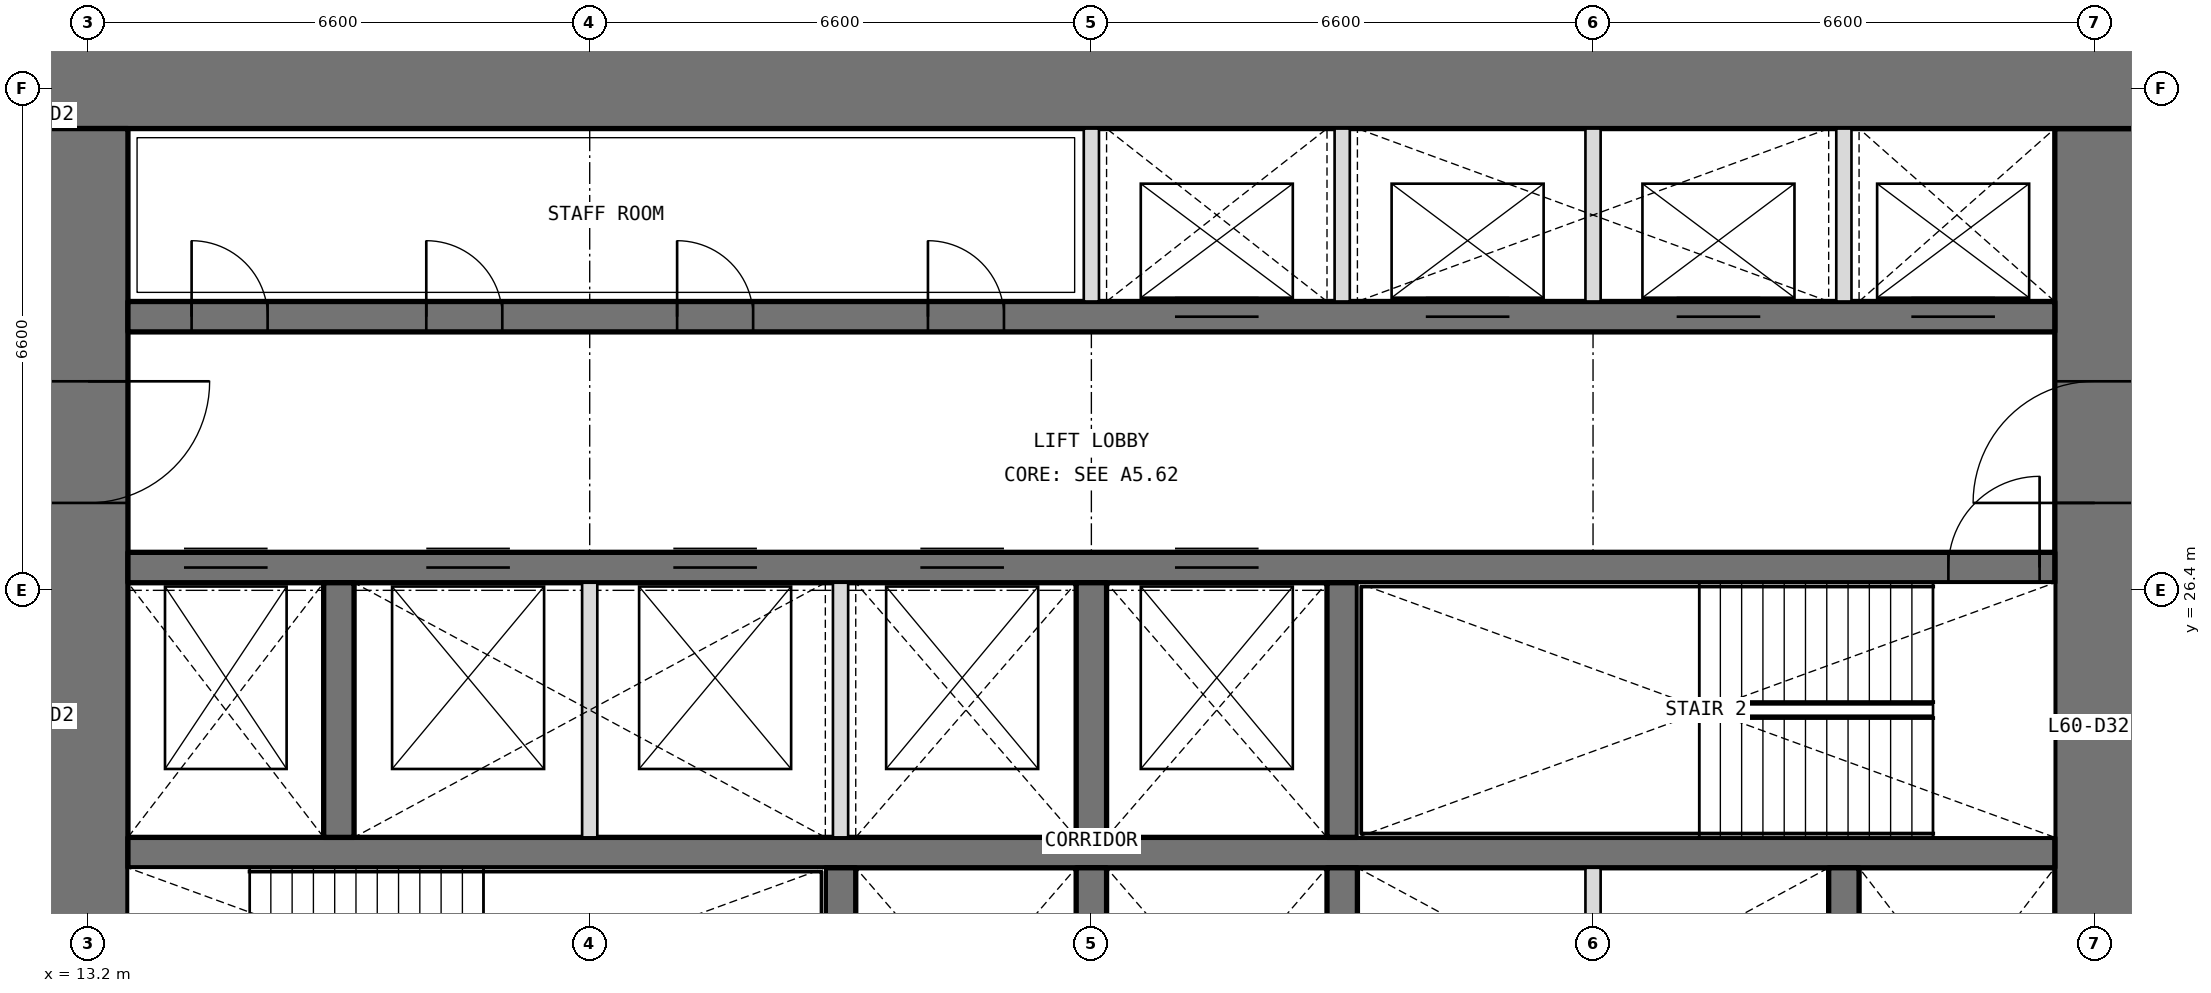
"""IFC4 building model, lengths in metres.
Left out: names, types, materials, properties, quantities, classifications, styles, units other than length and angle.
Written with IfcOpenShell. Run it as: python <this file> out.ifc"""

import sys

from ifc_helpers import new_model, si_unit, direction, frame, frame_2d, origin, place, context, subcontext, project, spatial, rectangle, extrude, element, fill, save


model = new_model("IFC4")
c1 = context("Model", 3, precision=1e-05, world=origin(), true_north=direction((0.0, 1.0)))
c2 = subcontext(c1, "Body", "Model", "MODEL_VIEW")
j1 = project(units=[si_unit("LENGTHUNIT", "METRE"), si_unit("PLANEANGLEUNIT", "RADIAN")], contexts=[c1])
p1 = place(None, origin())
s1 = spatial("IfcSite", under=j1, at=p1, CompositionType="ELEMENT")
p2 = place(p1, origin())
s2 = spatial("IfcBuilding", under=s1, at=p2, CompositionType="ELEMENT")
p3 = place(p2, frame((0.0, 0.0, 262.8)))
s3 = spatial("IfcBuildingStorey", under=s2, at=p3, CompositionType="ELEMENT", Elevation=262.8)
p4 = place(p3, frame((39.6, 13.725, 0.0), z_axis=(0.0, 0.0, 1.0), x_axis=(0.0, 1.0, 0.0)))
e1 = element("IfcWall", 1, at=p4, inside=s3, PredefinedType="SHEAR", context=c2, shape_type="SweptSolid", body=[
    extrude(rectangle(XDim=18.75, YDim=1.05, at=frame_2d((9.375, 0.0))), origin(), (0.0, 0.0, 1.0), 4.2),
])
p5 = place(p4, frame((3.025, 0.0, 0.0)))
e2 = element("IfcOpeningElement", 2, at=p5, cuts=e1, PredefinedType="OPENING", context=c2, shape_type="SweptSolid", body=[
    extrude(rectangle(XDim=1.6, YDim=2.1, at=frame_2d((0.8, 1.05))), frame((0.0, 0.535, 0.0), z_axis=(0.0, -1.0, 0.0), x_axis=(1.0, 0.0, 0.0)), (0.0, 0.0, 1.0), 1.07),
])
p6 = place(p4, frame((13.825, 0.0, 0.0)))
e3 = element("IfcOpeningElement", 3, at=p6, cuts=e1, PredefinedType="OPENING", context=c2, shape_type="SweptSolid", body=[
    extrude(rectangle(XDim=1.6, YDim=2.1, at=frame_2d((0.8, 1.05))), frame((0.0, 0.535, 0.0), z_axis=(0.0, -1.0, 0.0), x_axis=(1.0, 0.0, 0.0)), (0.0, 0.0, 1.0), 1.07),
])
p7 = place(p3, frame((40.125, 33.0, 0.0), z_axis=(0.0, 0.0, 1.0), x_axis=(-1.0, 0.0, 0.0)))
e4 = element("IfcWall", 4, at=p7, inside=s3, PredefinedType="SHEAR", context=c2, shape_type="SweptSolid", body=[
    extrude(rectangle(XDim=27.45, YDim=1.05, at=frame_2d((13.725, 0.0))), origin(), (0.0, 0.0, 1.0), 4.2),
])
p8 = place(p3, frame((13.2, 32.475, 0.0), z_axis=(0.0, 0.0, 1.0), x_axis=(0.0, -1.0, 0.0)))
e5 = element("IfcWall", 5, at=p8, inside=s3, PredefinedType="SHEAR", context=c2, shape_type="SweptSolid", body=[
    extrude(rectangle(XDim=18.75, YDim=1.05, at=frame_2d((9.375, 0.0))), origin(), (0.0, 0.0, 1.0), 4.2),
])
p9 = place(p8, frame((14.125, 0.0, 0.0)))
e6 = element("IfcOpeningElement", 6, at=p9, cuts=e5, PredefinedType="OPENING", context=c2, shape_type="SweptSolid", body=[
    extrude(rectangle(XDim=1.6, YDim=2.1, at=frame_2d((0.8, 1.05))), frame((0.0, 0.535, 0.0), z_axis=(0.0, -1.0, 0.0), x_axis=(1.0, 0.0, 0.0)), (0.0, 0.0, 1.0), 1.07),
])
p10 = place(p8, frame((3.325, 0.0, 0.0)))
e7 = element("IfcOpeningElement", 7, at=p10, cuts=e5, PredefinedType="OPENING", context=c2, shape_type="SweptSolid", body=[
    extrude(rectangle(XDim=1.6, YDim=2.1, at=frame_2d((0.8, 1.05))), frame((0.0, 0.535, 0.0), z_axis=(0.0, -1.0, 0.0), x_axis=(1.0, 0.0, 0.0)), (0.0, 0.0, 1.0), 1.07),
])
p11 = place(p3, frame((13.725, 22.95, 0.0), z_axis=(0.0, 0.0, 1.0), x_axis=(1.0, 0.0, 0.0)))
e8 = element("IfcWall", 8, at=p11, inside=s3, PredefinedType="SHEAR", context=c2, shape_type="SweptSolid", body=[
    extrude(rectangle(XDim=25.35, YDim=0.4, at=frame_2d((12.675, 0.0))), origin(), (0.0, 0.0, 1.0), 4.2),
])
p12 = place(p3, frame((13.725, 26.7, 0.0), z_axis=(0.0, 0.0, 1.0), x_axis=(1.0, 0.0, 0.0)))
e9 = element("IfcWall", 9, at=p12, inside=s3, PredefinedType="SHEAR", context=c2, shape_type="SweptSolid", body=[
    extrude(rectangle(XDim=25.35, YDim=0.4, at=frame_2d((12.675, 0.0))), origin(), (0.0, 0.0, 1.0), 4.2),
])
p13 = place(p12, frame((23.95, 0.0, 0.0)))
e10 = element("IfcOpeningElement", 10, at=p13, cuts=e9, PredefinedType="OPENING", context=c2, shape_type="SweptSolid", body=[
    extrude(rectangle(XDim=1.2, YDim=2.1, at=frame_2d((0.6, 1.05))), frame((0.0, 0.21, 0.0), z_axis=(0.0, -1.0, 0.0), x_axis=(1.0, 0.0, 0.0)), (0.0, 0.0, 1.0), 0.42),
])
p14 = place(p12, frame((0.738, 0.0, 0.0)))
e11 = element("IfcOpeningElement", 11, at=p14, cuts=e9, PredefinedType="OPENING", context=c2, shape_type="SweptSolid", body=[
    extrude(rectangle(XDim=1.1, YDim=2.1, at=frame_2d((0.55, 1.05))), frame((0.0, 0.21, 0.0), z_axis=(0.0, -1.0, 0.0), x_axis=(1.0, 0.0, 0.0)), (0.0, 0.0, 1.0), 0.42),
])
p15 = place(p12, frame((3.925, 0.0, 0.0)))
e12 = element("IfcOpeningElement", 12, at=p15, cuts=e9, PredefinedType="OPENING", context=c2, shape_type="SweptSolid", body=[
    extrude(rectangle(XDim=1.1, YDim=2.1, at=frame_2d((0.55, 1.05))), frame((0.0, 0.21, 0.0), z_axis=(0.0, -1.0, 0.0), x_axis=(1.0, 0.0, 0.0)), (0.0, 0.0, 1.0), 0.42),
])
p16 = place(p12, frame((7.175, 0.0, 0.0)))
e13 = element("IfcOpeningElement", 13, at=p16, cuts=e9, PredefinedType="OPENING", context=c2, shape_type="SweptSolid", body=[
    extrude(rectangle(XDim=1.1, YDim=2.1, at=frame_2d((0.55, 1.05))), frame((0.0, 0.21, 0.0), z_axis=(0.0, -1.0, 0.0), x_axis=(1.0, 0.0, 0.0)), (0.0, 0.0, 1.0), 0.42),
])
p17 = place(p12, frame((10.425, 0.0, 0.0)))
e14 = element("IfcOpeningElement", 14, at=p17, cuts=e9, PredefinedType="OPENING", context=c2, shape_type="SweptSolid", body=[
    extrude(rectangle(XDim=1.1, YDim=2.1, at=frame_2d((0.55, 1.05))), frame((0.0, 0.21, 0.0), z_axis=(0.0, -1.0, 0.0), x_axis=(1.0, 0.0, 0.0)), (0.0, 0.0, 1.0), 0.42),
])
p18 = place(p12, frame((13.775, 0.0, 0.0)))
e15 = element("IfcOpeningElement", 15, at=p18, cuts=e9, PredefinedType="OPENING", context=c2, shape_type="SweptSolid", body=[
    extrude(rectangle(XDim=1.1, YDim=2.1, at=frame_2d((0.55, 1.05))), frame((0.0, 0.21, 0.0), z_axis=(0.0, -1.0, 0.0), x_axis=(1.0, 0.0, 0.0)), (0.0, 0.0, 1.0), 0.42),
])
p19 = place(p3, frame((13.725, 30.0, 0.0), z_axis=(0.0, 0.0, 1.0), x_axis=(1.0, 0.0, 0.0)))
e16 = element("IfcWall", 16, at=p19, inside=s3, PredefinedType="SHEAR", context=c2, shape_type="SweptSolid", body=[
    extrude(rectangle(XDim=25.35, YDim=0.4, at=frame_2d((12.675, 0.0))), origin(), (0.0, 0.0, 1.0), 4.2),
])
p20 = place(p19, frame((0.837, 0.0, 0.0)))
e17 = element("IfcOpeningElement", 17, at=p20, cuts=e16, PredefinedType="OPENING", context=c2, shape_type="SweptSolid", body=[
    extrude(rectangle(XDim=1.0, YDim=2.1, at=frame_2d((0.5, 1.05))), frame((0.0, 0.21, 0.0), z_axis=(0.0, -1.0, 0.0), x_axis=(1.0, 0.0, 0.0)), (0.0, 0.0, 1.0), 0.42),
])
p21 = place(p19, frame((3.925, 0.0, 0.0)))
e18 = element("IfcOpeningElement", 18, at=p21, cuts=e16, PredefinedType="OPENING", context=c2, shape_type="SweptSolid", body=[
    extrude(rectangle(XDim=1.0, YDim=2.1, at=frame_2d((0.5, 1.05))), frame((0.0, 0.21, 0.0), z_axis=(0.0, -1.0, 0.0), x_axis=(1.0, 0.0, 0.0)), (0.0, 0.0, 1.0), 0.42),
])
p22 = place(p19, frame((7.225, 0.0, 0.0)))
e19 = element("IfcOpeningElement", 19, at=p22, cuts=e16, PredefinedType="OPENING", context=c2, shape_type="SweptSolid", body=[
    extrude(rectangle(XDim=1.0, YDim=2.1, at=frame_2d((0.5, 1.05))), frame((0.0, 0.21, 0.0), z_axis=(0.0, -1.0, 0.0), x_axis=(1.0, 0.0, 0.0)), (0.0, 0.0, 1.0), 0.42),
])
p23 = place(p19, frame((10.525, 0.0, 0.0)))
e20 = element("IfcOpeningElement", 20, at=p23, cuts=e16, PredefinedType="OPENING", context=c2, shape_type="SweptSolid", body=[
    extrude(rectangle(XDim=1.0, YDim=2.1, at=frame_2d((0.5, 1.05))), frame((0.0, 0.21, 0.0), z_axis=(0.0, -1.0, 0.0), x_axis=(1.0, 0.0, 0.0)), (0.0, 0.0, 1.0), 0.42),
])
p24 = place(p19, frame((13.775, 0.0, 0.0)))
e21 = element("IfcOpeningElement", 21, at=p24, cuts=e16, PredefinedType="OPENING", context=c2, shape_type="SweptSolid", body=[
    extrude(rectangle(XDim=1.1, YDim=2.1, at=frame_2d((0.55, 1.05))), frame((0.0, 0.21, 0.0), z_axis=(0.0, -1.0, 0.0), x_axis=(1.0, 0.0, 0.0)), (0.0, 0.0, 1.0), 0.42),
])
p25 = place(p19, frame((17.075, 0.0, 0.0)))
e22 = element("IfcOpeningElement", 22, at=p25, cuts=e16, PredefinedType="OPENING", context=c2, shape_type="SweptSolid", body=[
    extrude(rectangle(XDim=1.1, YDim=2.1, at=frame_2d((0.55, 1.05))), frame((0.0, 0.21, 0.0), z_axis=(0.0, -1.0, 0.0), x_axis=(1.0, 0.0, 0.0)), (0.0, 0.0, 1.0), 0.42),
])
p26 = place(p19, frame((20.375, 0.0, 0.0)))
e23 = element("IfcOpeningElement", 23, at=p26, cuts=e16, PredefinedType="OPENING", context=c2, shape_type="SweptSolid", body=[
    extrude(rectangle(XDim=1.1, YDim=2.1, at=frame_2d((0.55, 1.05))), frame((0.0, 0.21, 0.0), z_axis=(0.0, -1.0, 0.0), x_axis=(1.0, 0.0, 0.0)), (0.0, 0.0, 1.0), 0.42),
])
p27 = place(p19, frame((23.462, 0.0, 0.0)))
e24 = element("IfcOpeningElement", 24, at=p27, cuts=e16, PredefinedType="OPENING", context=c2, shape_type="SweptSolid", body=[
    extrude(rectangle(XDim=1.1, YDim=2.1, at=frame_2d((0.55, 1.05))), frame((0.0, 0.21, 0.0), z_axis=(0.0, -1.0, 0.0), x_axis=(1.0, 0.0, 0.0)), (0.0, 0.0, 1.0), 0.42),
])
for number, where, z_axis, x_axis in (
    (25, (23.1, 19.4, 0.0), (0.0, 0.0, 1.0), (0.0, 1.0, 0.0)),
    (26, (26.4, 19.4, 0.0), (0.0, 0.0, 1.0), (0.0, 1.0, 0.0)),
    (27, (29.7, 19.4, 0.0), (0.0, 0.0, 1.0), (0.0, 1.0, 0.0)),
    (28, (36.3, 19.4, 0.0), (0.0, 0.0, 1.0), (0.0, 1.0, 0.0)),
    (29, (16.5, 23.15, 0.0), (0.0, 0.0, 1.0), (0.0, 1.0, 0.0)),
    (30, (26.4, 23.15, 0.0), (0.0, 0.0, 1.0), (0.0, 1.0, 0.0)),
    (31, (29.7, 23.15, 0.0), (0.0, 0.0, 1.0), (0.0, 1.0, 0.0)),
):
    element("IfcWall", number, at=place(p3, frame(where, z_axis=z_axis, x_axis=x_axis)), inside=s3, PredefinedType="SHEAR", context=c2, shape_type="SweptSolid", body=[
        extrude(rectangle(XDim=3.35, YDim=0.4, at=frame_2d((1.675, 0.0))), origin(), (0.0, 0.0, 1.0), 4.2),
    ])
for number, where, z_axis, x_axis in (
    (32, (26.4, 30.2, 0.0), (0.0, 0.0, 1.0), (0.0, 1.0, 0.0)),
    (33, (29.7, 30.2, 0.0), (0.0, 0.0, 1.0), (0.0, 1.0, 0.0)),
    (34, (33.0, 30.2, 0.0), (0.0, 0.0, 1.0), (0.0, 1.0, 0.0)),
    (35, (36.3, 30.2, 0.0), (0.0, 0.0, 1.0), (0.0, 1.0, 0.0)),
):
    element("IfcWall", number, at=place(p3, frame(where, z_axis=z_axis, x_axis=x_axis)), inside=s3, PredefinedType="PARTITIONING", context=c2, shape_type="SweptSolid", body=[
        extrude(rectangle(XDim=2.275, YDim=0.2, at=frame_2d((1.138, 0.0))), origin(), (0.0, 0.0, 1.0), 4.2),
    ])
for number, where, z_axis, x_axis in (
    (36, (33.0, 19.4, 0.0), (0.0, 0.0, 1.0), (0.0, 1.0, 0.0)),
    (37, (19.8, 23.15, 0.0), (0.0, 0.0, 1.0), (0.0, 1.0, 0.0)),
    (38, (23.1, 23.15, 0.0), (0.0, 0.0, 1.0), (0.0, 1.0, 0.0)),
):
    element("IfcWall", number, at=place(p3, frame(where, z_axis=z_axis, x_axis=x_axis)), inside=s3, PredefinedType="PARTITIONING", context=c2, shape_type="SweptSolid", body=[
        extrude(rectangle(XDim=3.35, YDim=0.2, at=frame_2d((1.675, 0.0))), origin(), (0.0, 0.0, 1.0), 4.2),
    ])
p28 = place(p20, origin())
e39 = element("IfcDoor", 39, at=p28, inside=s3, OperationType="SINGLE_SWING_LEFT", PredefinedType="DOOR", context=c2, shape_type="SweptSolid", body=[
    extrude(rectangle(XDim=1.0, YDim=2.1, at=frame_2d((0.5, 1.05))), frame((0.0, 0.025, 0.0), z_axis=(0.0, -1.0, 0.0), x_axis=(1.0, 0.0, 0.0)), (0.0, 0.0, 1.0), 0.05),
])
fill(e17, e39)
p29 = place(p21, origin())
e40 = element("IfcDoor", 40, at=p29, inside=s3, OperationType="SINGLE_SWING_LEFT", PredefinedType="DOOR", context=c2, shape_type="SweptSolid", body=[
    extrude(rectangle(XDim=1.0, YDim=2.1, at=frame_2d((0.5, 1.05))), frame((0.0, 0.025, 0.0), z_axis=(0.0, -1.0, 0.0), x_axis=(1.0, 0.0, 0.0)), (0.0, 0.0, 1.0), 0.05),
])
fill(e18, e40)
p30 = place(p22, origin())
e41 = element("IfcDoor", 41, at=p30, inside=s3, OperationType="SINGLE_SWING_LEFT", PredefinedType="DOOR", context=c2, shape_type="SweptSolid", body=[
    extrude(rectangle(XDim=1.0, YDim=2.1, at=frame_2d((0.5, 1.05))), frame((0.0, 0.025, 0.0), z_axis=(0.0, -1.0, 0.0), x_axis=(1.0, 0.0, 0.0)), (0.0, 0.0, 1.0), 0.05),
])
fill(e19, e41)
p31 = place(p23, origin())
e42 = element("IfcDoor", 42, at=p31, inside=s3, OperationType="SINGLE_SWING_LEFT", PredefinedType="DOOR", context=c2, shape_type="SweptSolid", body=[
    extrude(rectangle(XDim=1.0, YDim=2.1, at=frame_2d((0.5, 1.05))), frame((0.0, 0.025, 0.0), z_axis=(0.0, -1.0, 0.0), x_axis=(1.0, 0.0, 0.0)), (0.0, 0.0, 1.0), 0.05),
])
fill(e20, e42)
p32 = place(p13, origin())
e43 = element("IfcDoor", 43, at=p32, inside=s3, OperationType="SINGLE_SWING_RIGHT", PredefinedType="DOOR", context=c2, shape_type="SweptSolid", body=[
    extrude(rectangle(XDim=1.2, YDim=2.1, at=frame_2d((0.6, 1.05))), frame((0.0, 0.025, 0.0), z_axis=(0.0, -1.0, 0.0), x_axis=(1.0, 0.0, 0.0)), (0.0, 0.0, 1.0), 0.05),
])
fill(e10, e43)
p33 = place(p10, origin())
e44 = element("IfcDoor", 44, at=p33, inside=s3, OperationType="DOUBLE_DOOR_DOUBLE_SWING", PredefinedType="DOOR", context=c2, shape_type="SweptSolid", body=[
    extrude(rectangle(XDim=1.6, YDim=2.1, at=frame_2d((0.8, 1.05))), frame((0.0, 0.025, 0.0), z_axis=(0.0, -1.0, 0.0), x_axis=(1.0, 0.0, 0.0)), (0.0, 0.0, 1.0), 0.05),
])
fill(e7, e44)
p34 = place(p6, origin())
e45 = element("IfcDoor", 45, at=p34, inside=s3, OperationType="DOUBLE_DOOR_DOUBLE_SWING", PredefinedType="DOOR", context=c2, shape_type="SweptSolid", body=[
    extrude(rectangle(XDim=1.6, YDim=2.1, at=frame_2d((0.8, 1.05))), frame((0.0, 0.025, 0.0), z_axis=(0.0, -1.0, 0.0), x_axis=(1.0, 0.0, 0.0)), (0.0, 0.0, 1.0), 0.05),
])
fill(e3, e45)
p35 = place(p24, origin())
e46 = element("IfcDoor", 46, at=p35, inside=s3, OperationType="DOUBLE_DOOR_SLIDING", PredefinedType="DOOR", context=c2, shape_type="SweptSolid", body=[
    extrude(rectangle(XDim=1.1, YDim=2.1, at=frame_2d((0.55, 1.05))), frame((0.0, 0.025, 0.0), z_axis=(0.0, -1.0, 0.0), x_axis=(1.0, 0.0, 0.0)), (0.0, 0.0, 1.0), 0.05),
])
fill(e21, e46)
p36 = place(p25, origin())
e47 = element("IfcDoor", 47, at=p36, inside=s3, OperationType="DOUBLE_DOOR_SLIDING", PredefinedType="DOOR", context=c2, shape_type="SweptSolid", body=[
    extrude(rectangle(XDim=1.1, YDim=2.1, at=frame_2d((0.55, 1.05))), frame((0.0, 0.025, 0.0), z_axis=(0.0, -1.0, 0.0), x_axis=(1.0, 0.0, 0.0)), (0.0, 0.0, 1.0), 0.05),
])
fill(e22, e47)
p37 = place(p26, origin())
e48 = element("IfcDoor", 48, at=p37, inside=s3, OperationType="DOUBLE_DOOR_SLIDING", PredefinedType="DOOR", context=c2, shape_type="SweptSolid", body=[
    extrude(rectangle(XDim=1.1, YDim=2.1, at=frame_2d((0.55, 1.05))), frame((0.0, 0.025, 0.0), z_axis=(0.0, -1.0, 0.0), x_axis=(1.0, 0.0, 0.0)), (0.0, 0.0, 1.0), 0.05),
])
fill(e23, e48)
p38 = place(p27, origin())
e49 = element("IfcDoor", 49, at=p38, inside=s3, OperationType="DOUBLE_DOOR_SLIDING", PredefinedType="DOOR", context=c2, shape_type="SweptSolid", body=[
    extrude(rectangle(XDim=1.1, YDim=2.1, at=frame_2d((0.55, 1.05))), frame((0.0, 0.025, 0.0), z_axis=(0.0, -1.0, 0.0), x_axis=(1.0, 0.0, 0.0)), (0.0, 0.0, 1.0), 0.05),
])
fill(e24, e49)
p39 = place(p14, origin())
e50 = element("IfcDoor", 50, at=p39, inside=s3, OperationType="DOUBLE_DOOR_SLIDING", PredefinedType="DOOR", context=c2, shape_type="SweptSolid", body=[
    extrude(rectangle(XDim=1.1, YDim=2.1, at=frame_2d((0.55, 1.05))), frame((0.0, 0.025, 0.0), z_axis=(0.0, -1.0, 0.0), x_axis=(1.0, 0.0, 0.0)), (0.0, 0.0, 1.0), 0.05),
])
fill(e11, e50)
p40 = place(p15, origin())
e51 = element("IfcDoor", 51, at=p40, inside=s3, OperationType="DOUBLE_DOOR_SLIDING", PredefinedType="DOOR", context=c2, shape_type="SweptSolid", body=[
    extrude(rectangle(XDim=1.1, YDim=2.1, at=frame_2d((0.55, 1.05))), frame((0.0, 0.025, 0.0), z_axis=(0.0, -1.0, 0.0), x_axis=(1.0, 0.0, 0.0)), (0.0, 0.0, 1.0), 0.05),
])
fill(e12, e51)
p41 = place(p16, origin())
e52 = element("IfcDoor", 52, at=p41, inside=s3, OperationType="DOUBLE_DOOR_SLIDING", PredefinedType="DOOR", context=c2, shape_type="SweptSolid", body=[
    extrude(rectangle(XDim=1.1, YDim=2.1, at=frame_2d((0.55, 1.05))), frame((0.0, 0.025, 0.0), z_axis=(0.0, -1.0, 0.0), x_axis=(1.0, 0.0, 0.0)), (0.0, 0.0, 1.0), 0.05),
])
fill(e13, e52)
p42 = place(p17, origin())
e53 = element("IfcDoor", 53, at=p42, inside=s3, OperationType="DOUBLE_DOOR_SLIDING", PredefinedType="DOOR", context=c2, shape_type="SweptSolid", body=[
    extrude(rectangle(XDim=1.1, YDim=2.1, at=frame_2d((0.55, 1.05))), frame((0.0, 0.025, 0.0), z_axis=(0.0, -1.0, 0.0), x_axis=(1.0, 0.0, 0.0)), (0.0, 0.0, 1.0), 0.05),
])
fill(e14, e53)
p43 = place(p18, origin())
e54 = element("IfcDoor", 54, at=p43, inside=s3, OperationType="DOUBLE_DOOR_SLIDING", PredefinedType="DOOR", context=c2, shape_type="SweptSolid", body=[
    extrude(rectangle(XDim=1.1, YDim=2.1, at=frame_2d((0.55, 1.05))), frame((0.0, 0.025, 0.0), z_axis=(0.0, -1.0, 0.0), x_axis=(1.0, 0.0, 0.0)), (0.0, 0.0, 1.0), 0.05),
])
fill(e15, e54)
save(model, sys.argv[1])
